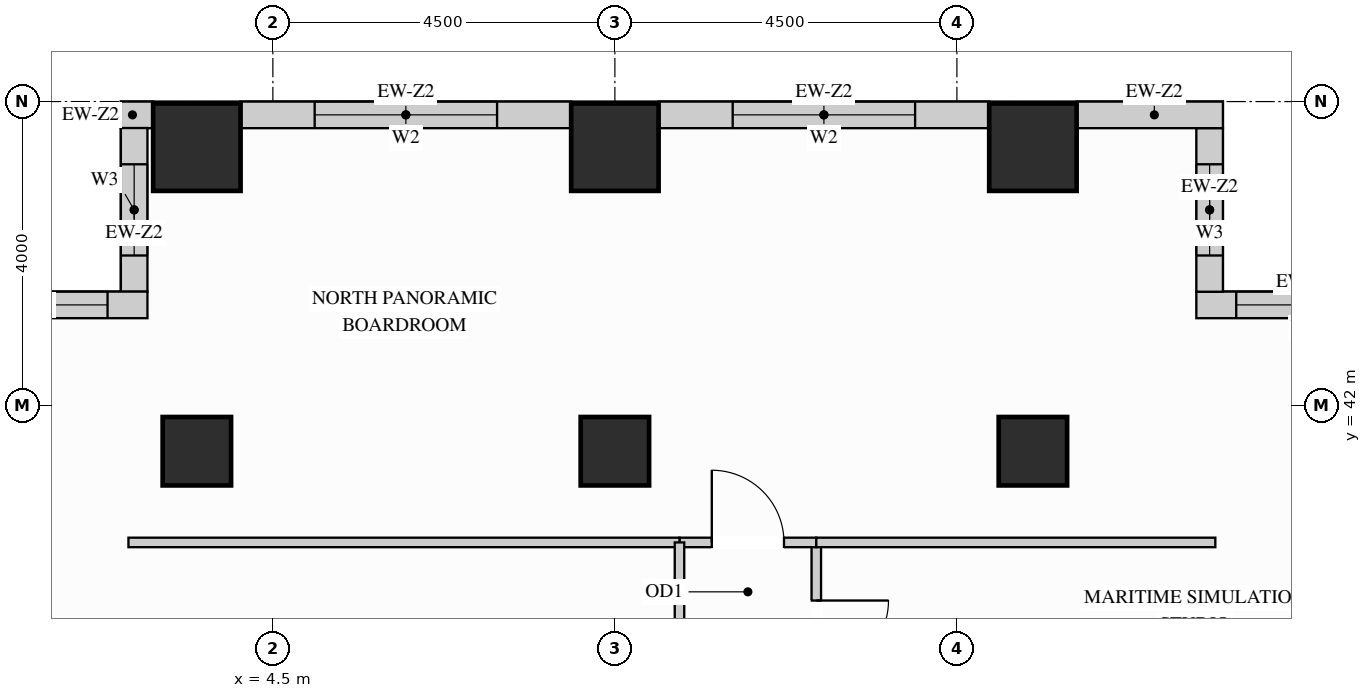
"""IFC4 building model, lengths in metres.
Left out: names, types, materials, properties, quantities, classifications, styles, units other than length and angle.
Written with IfcOpenShell. Run it as: python <this file> out.ifc"""

import sys

from ifc_helpers import new_model, si_unit, direction, frame, frame_2d, origin, origin_2d, place, context, subcontext, project, spatial, rectangle, extrude, source, transform, mapped, element, fill, save


model = new_model("IFC4")
c1 = context("Model", 3, precision=1e-05, world=origin(), true_north=direction((0.0, 1.0)))
c2 = subcontext(c1, "Body", "Model", "MODEL_VIEW")
j1 = project(units=[si_unit("LENGTHUNIT", "METRE"), si_unit("PLANEANGLEUNIT", "RADIAN")], contexts=[c1])
p1 = place(None, origin())
s1 = spatial("IfcSite", under=j1, at=p1, CompositionType="ELEMENT")
p2 = place(p1, origin())
s2 = spatial("IfcBuilding", under=s1, at=p2, CompositionType="ELEMENT")
p3 = place(p2, frame((0.0, 0.0, 127.8)))
s3 = spatial("IfcBuildingStorey", under=s2, at=p3, CompositionType="ELEMENT", Elevation=127.8)
m1 = source(origin(), c2, "Body", "SweptSolid", [
    extrude(rectangle(XDim=0.9, YDim=0.9, at=origin_2d()), origin(), (0.0, 0.0, 1.0), 3.38),
])
for number, where, z_axis, x_axis in (
    (1, (14.5, 41.4, 0.0), (0.0, 0.0, 1.0), (1.0, 0.0, 0.0)),
    (2, (3.5, 41.4, 0.0), (0.0, 0.0, 1.0), (1.0, 0.0, 0.0)),
    (3, (9.0, 41.4, 0.0), (0.0, 0.0, 1.0), (1.0, 0.0, 0.0)),
):
    element("IfcColumn", number, at=place(p3, frame(where, z_axis=z_axis, x_axis=x_axis)), inside=s3, PredefinedType="COLUMN", context=c2, shape_type="MappedRepresentation", body=[
        mapped(m1, transform((0.0, 0.0, 0.0), x_axis=(1.0, 0.0, 0.0), y_axis=(0.0, 1.0, 0.0), z_axis=(0.0, 0.0, 1.0))),
    ])
m2 = source(origin(), c2, "Body", "SweptSolid", [
    extrude(rectangle(XDim=1.15, YDim=1.15, at=origin_2d()), origin(), (0.0, 0.0, 1.0), 3.38),
])
for number, where, z_axis, x_axis in (
    (4, (14.5, 45.4, 0.0), (0.0, 0.0, 1.0), (1.0, 0.0, 0.0)),
    (5, (3.5, 45.4, 0.0), (0.0, 0.0, 1.0), (1.0, 0.0, 0.0)),
    (6, (9.0, 45.4, 0.0), (0.0, 0.0, 1.0), (1.0, 0.0, 0.0)),
):
    element("IfcColumn", number, at=place(p3, frame(where, z_axis=z_axis, x_axis=x_axis)), inside=s3, PredefinedType="COLUMN", context=c2, shape_type="MappedRepresentation", body=[
        mapped(m2, transform((0.0, 0.0, 0.0), x_axis=(1.0, 0.0, 0.0), y_axis=(0.0, 1.0, 0.0), z_axis=(0.0, 0.0, 1.0))),
    ])
p4 = place(p3, frame((19.5, 43.325, 0.0), z_axis=(0.0, 0.0, 1.0), x_axis=(-1.0, 0.0, 0.0)))
e7 = element("IfcWall", 7, at=p4, inside=s3, PredefinedType="SOLIDWALL", context=c2, shape_type="SweptSolid", body=[
    extrude(rectangle(XDim=2.85, YDim=0.35, at=frame_2d((1.425, 0.0))), origin(), (0.0, 0.0, 1.0), 3.365),
])
p5 = place(p4, frame((0.525, 0.0, 0.78)))
e8 = element("IfcOpeningElement", 8, at=p5, cuts=e7, PredefinedType="OPENING", context=c2, shape_type="SweptSolid", body=[
    extrude(rectangle(XDim=1.8, YDim=2.1, at=frame_2d((0.9, 1.05))), frame((0.0, 0.185, 0.0), z_axis=(0.0, -1.0, 0.0), x_axis=(1.0, 0.0, 0.0)), (0.0, 0.0, 1.0), 0.37),
])
p6 = place(p3, frame((16.825, 43.498, 0.0), z_axis=(0.0, 0.0, 1.0), x_axis=(0.0, 1.0, 0.0)))
e9 = element("IfcWall", 9, at=p6, inside=s3, PredefinedType="SOLIDWALL", context=c2, shape_type="SweptSolid", body=[
    extrude(rectangle(XDim=2.154, YDim=0.35, at=frame_2d((1.077, 0.0))), origin(), (0.0, 0.0, 1.0), 3.365),
])
p7 = place(p6, frame((0.477, 0.0, 0.78)))
e10 = element("IfcOpeningElement", 10, at=p7, cuts=e9, PredefinedType="OPENING", context=c2, shape_type="SweptSolid", body=[
    extrude(rectangle(XDim=1.2, YDim=2.1, at=frame_2d((0.6, 1.05))), frame((0.0, 0.185, 0.0), z_axis=(0.0, -1.0, 0.0), x_axis=(1.0, 0.0, 0.0)), (0.0, 0.0, 1.0), 0.37),
])
m3 = source(origin(), c2, "Body", "SweptSolid", [
    extrude(rectangle(XDim=1.927, YDim=0.35, at=frame_2d((0.963, 0.0))), origin(), (0.0, 0.0, 1.0), 3.365),
])
p8 = place(p3, frame((17.0, 45.825, 0.0), z_axis=(0.0, 0.0, 1.0), x_axis=(-1.0, 0.0, 0.0)))
e11 = element("IfcWall", 11, at=p8, inside=s3, PredefinedType="SOLIDWALL", context=c2, shape_type="MappedRepresentation", body=[
    mapped(m3, transform((0.0, 0.0, 0.0), x_axis=(1.0, 0.0, 0.0), y_axis=(0.0, 1.0, 0.0), z_axis=(0.0, 0.0, 1.0))),
])
p9 = place(p3, frame((13.927, 45.825, 0.0), z_axis=(0.0, 0.0, 1.0), x_axis=(-1.0, 0.0, 0.0)))
e12 = element("IfcWall", 12, at=p9, inside=s3, PredefinedType="SOLIDWALL", context=c2, shape_type="SweptSolid", body=[
    extrude(rectangle(XDim=4.354, YDim=0.35, at=frame_2d((2.177, 0.0))), origin(), (0.0, 0.0, 1.0), 3.365),
])
p10 = place(p9, frame((0.977, 0.0, 0.78)))
e13 = element("IfcOpeningElement", 13, at=p10, cuts=e12, PredefinedType="OPENING", context=c2, shape_type="SweptSolid", body=[
    extrude(rectangle(XDim=2.4, YDim=2.1, at=frame_2d((1.2, 1.05))), frame((0.0, 0.185, 0.0), z_axis=(0.0, -1.0, 0.0), x_axis=(1.0, 0.0, 0.0)), (0.0, 0.0, 1.0), 0.37),
])
p11 = place(p3, frame((8.427, 45.825, 0.0), z_axis=(0.0, 0.0, 1.0), x_axis=(-1.0, 0.0, 0.0)))
e14 = element("IfcWall", 14, at=p11, inside=s3, PredefinedType="SOLIDWALL", context=c2, shape_type="SweptSolid", body=[
    extrude(rectangle(XDim=4.354, YDim=0.35, at=frame_2d((2.177, 0.0))), origin(), (0.0, 0.0, 1.0), 3.365),
])
p12 = place(p11, frame((0.977, 0.0, 0.78)))
e15 = element("IfcOpeningElement", 15, at=p12, cuts=e14, PredefinedType="OPENING", context=c2, shape_type="SweptSolid", body=[
    extrude(rectangle(XDim=2.4, YDim=2.1, at=frame_2d((1.2, 1.05))), frame((0.0, 0.185, 0.0), z_axis=(0.0, -1.0, 0.0), x_axis=(1.0, 0.0, 0.0)), (0.0, 0.0, 1.0), 0.37),
])
m4 = source(origin(), c2, "Body", "SweptSolid", [
    extrude(rectangle(XDim=0.427, YDim=0.35, at=frame_2d((0.213, 0.0))), origin(), (0.0, 0.0, 1.0), 3.365),
])
p13 = place(p3, frame((2.927, 45.825, 0.0), z_axis=(0.0, 0.0, 1.0), x_axis=(-1.0, 0.0, 0.0)))
e16 = element("IfcWall", 16, at=p13, inside=s3, PredefinedType="SOLIDWALL", context=c2, shape_type="MappedRepresentation", body=[
    mapped(m4, transform((0.0, 0.0, 0.0), x_axis=(1.0, 0.0, 0.0), y_axis=(0.0, 1.0, 0.0), z_axis=(0.0, 0.0, 1.0))),
])
p14 = place(p3, frame((2.675, 45.652, 0.0), z_axis=(0.0, 0.0, 1.0), x_axis=(0.0, -1.0, 0.0)))
e17 = element("IfcWall", 17, at=p14, inside=s3, PredefinedType="SOLIDWALL", context=c2, shape_type="SweptSolid", body=[
    extrude(rectangle(XDim=2.154, YDim=0.35, at=frame_2d((1.077, 0.0))), origin(), (0.0, 0.0, 1.0), 3.365),
])
p15 = place(p14, frame((0.477, 0.0, 0.78)))
e18 = element("IfcOpeningElement", 18, at=p15, cuts=e17, PredefinedType="OPENING", context=c2, shape_type="SweptSolid", body=[
    extrude(rectangle(XDim=1.2, YDim=2.1, at=frame_2d((0.6, 1.05))), frame((0.0, 0.185, 0.0), z_axis=(0.0, -1.0, 0.0), x_axis=(1.0, 0.0, 0.0)), (0.0, 0.0, 1.0), 0.37),
])
p16 = place(p3, frame((2.85, 43.325, 0.0), z_axis=(0.0, 0.0, 1.0), x_axis=(-1.0, 0.0, 0.0)))
e19 = element("IfcWall", 19, at=p16, inside=s3, PredefinedType="SOLIDWALL", context=c2, shape_type="SweptSolid", body=[
    extrude(rectangle(XDim=2.85, YDim=0.35, at=frame_2d((1.425, 0.0))), origin(), (0.0, 0.0, 1.0), 3.365),
])
p17 = place(p16, frame((0.525, 0.0, 0.78)))
e20 = element("IfcOpeningElement", 20, at=p17, cuts=e19, PredefinedType="OPENING", context=c2, shape_type="SweptSolid", body=[
    extrude(rectangle(XDim=1.8, YDim=2.1, at=frame_2d((0.9, 1.05))), frame((0.0, 0.185, 0.0), z_axis=(0.0, -1.0, 0.0), x_axis=(1.0, 0.0, 0.0)), (0.0, 0.0, 1.0), 0.37),
])
p18 = place(p3, frame((11.65, 37.721, 0.0), z_axis=(0.0, 0.0, 1.0), x_axis=(0.0, 1.0, 0.0)))
e21 = element("IfcWall", 21, at=p18, inside=s3, PredefinedType="PARTITIONING", context=c2, shape_type="SweptSolid", body=[
    extrude(rectangle(XDim=2.479, YDim=0.125, at=frame_2d((1.24, 0.0))), origin(), (0.0, 0.0, 1.0), 3.365),
])
p19 = place(p18, frame((0.764, 0.0, 0.0)))
e22 = element("IfcOpeningElement", 22, at=p19, cuts=e21, PredefinedType="OPENING", context=c2, shape_type="SweptSolid", body=[
    extrude(rectangle(XDim=0.95, YDim=2.15, at=frame_2d((0.475, 1.075))), frame((0.0, 0.073, 0.0), z_axis=(0.0, -1.0, 0.0), x_axis=(1.0, 0.0, 0.0)), (0.0, 0.0, 1.0), 0.145),
])
p20 = place(p3, frame((9.85, 40.2, 0.0), z_axis=(0.0, 0.0, 1.0), x_axis=(1.0, 0.0, 0.0)))
e23 = element("IfcWall", 23, at=p20, inside=s3, PredefinedType="PARTITIONING", context=c2, shape_type="SweptSolid", body=[
    extrude(rectangle(XDim=1.8, YDim=0.125, at=frame_2d((0.9, 0.0))), origin(), (0.0, 0.0, 1.0), 3.365),
])
p21 = place(p20, frame((0.425, 0.0, 0.0)))
e24 = element("IfcOpeningElement", 24, at=p21, cuts=e23, PredefinedType="OPENING", context=c2, shape_type="SweptSolid", body=[
    extrude(rectangle(XDim=0.95, YDim=2.15, at=frame_2d((0.475, 1.075))), frame((0.0, 0.073, 0.0), z_axis=(0.0, -1.0, 0.0), x_axis=(1.0, 0.0, 0.0)), (0.0, 0.0, 1.0), 0.145),
])
m5 = source(origin(), c2, "Body", "SweptSolid", [
    extrude(rectangle(XDim=5.25, YDim=0.125, at=frame_2d((2.625, 0.0))), origin(), (0.0, 0.0, 1.0), 3.365),
])
p22 = place(p3, frame((11.65, 40.2, 0.0), z_axis=(0.0, 0.0, 1.0), x_axis=(1.0, 0.0, 0.0)))
e25 = element("IfcWall", 25, at=p22, inside=s3, PredefinedType="PARTITIONING", context=c2, shape_type="MappedRepresentation", body=[
    mapped(m5, transform((0.0, 0.0, 0.0), x_axis=(1.0, 0.0, 0.0), y_axis=(0.0, 1.0, 0.0), z_axis=(0.0, 0.0, 1.0))),
])
m6 = source(origin(), c2, "Body", "SweptSolid", [
    extrude(rectangle(XDim=7.25, YDim=0.125, at=frame_2d((3.625, 0.0))), origin(), (0.0, 0.0, 1.0), 3.365),
])
p23 = place(p3, frame((2.6, 40.2, 0.0), z_axis=(0.0, 0.0, 1.0), x_axis=(1.0, 0.0, 0.0)))
e26 = element("IfcWall", 26, at=p23, inside=s3, PredefinedType="PARTITIONING", context=c2, shape_type="MappedRepresentation", body=[
    mapped(m6, transform((0.0, 0.0, 0.0), x_axis=(1.0, 0.0, 0.0), y_axis=(0.0, 1.0, 0.0), z_axis=(0.0, 0.0, 1.0))),
])
p24 = place(p3, frame((9.85, 35.498, 0.0), z_axis=(0.0, 0.0, 1.0), x_axis=(0.0, 1.0, 0.0)))
e27 = element("IfcWall", 27, at=p24, inside=s3, PredefinedType="PARTITIONING", context=c2, shape_type="SweptSolid", body=[
    extrude(rectangle(XDim=4.702, YDim=0.125, at=frame_2d((2.351, 0.0))), origin(), (0.0, 0.0, 1.0), 3.365),
])
p25 = place(p24, frame((0.392, 0.0, 0.0)))
e28 = element("IfcOpeningElement", 28, at=p25, cuts=e27, PredefinedType="OPENING", context=c2, shape_type="SweptSolid", body=[
    extrude(rectangle(XDim=0.95, YDim=2.15, at=frame_2d((0.475, 1.075))), frame((0.0, 0.073, 0.0), z_axis=(0.0, -1.0, 0.0), x_axis=(1.0, 0.0, 0.0)), (0.0, 0.0, 1.0), 0.145),
])
m7 = source(origin(), c2, "Body", "SweptSolid", [
    extrude(rectangle(XDim=0.95, YDim=2.15, at=frame_2d((0.475, 1.075))), frame((0.0, 0.025, 0.0), z_axis=(0.0, -1.0, 0.0), x_axis=(1.0, 0.0, 0.0)), (0.0, 0.0, 1.0), 0.05),
])
p26 = place(p19, origin())
e29 = element("IfcDoor", 29, at=p26, inside=s3, OperationType="SINGLE_SWING_RIGHT", PredefinedType="DOOR", context=c2, shape_type="MappedRepresentation", body=[
    mapped(m7, transform((0.0, 0.0, 0.0), x_axis=(1.0, 0.0, 0.0), y_axis=(0.0, 1.0, 0.0), z_axis=(0.0, 0.0, 1.0))),
])
fill(e22, e29)
p27 = place(p21, origin())
e30 = element("IfcDoor", 30, at=p27, inside=s3, OperationType="SINGLE_SWING_LEFT", PredefinedType="DOOR", context=c2, shape_type="MappedRepresentation", body=[
    mapped(m7, transform((0.0, 0.0, 0.0), x_axis=(1.0, 0.0, 0.0), y_axis=(0.0, 1.0, 0.0), z_axis=(0.0, 0.0, 1.0))),
])
fill(e24, e30)
m8 = source(origin(), c2, "Body", "SweptSolid", [
    extrude(rectangle(XDim=1.8, YDim=2.1, at=frame_2d((0.9, 1.05))), frame((0.0, 0.03, 0.0), z_axis=(0.0, -1.0, 0.0), x_axis=(1.0, 0.0, 0.0)), (0.0, 0.0, 1.0), 0.06),
])
p28 = place(p5, origin())
e31 = element("IfcWindow", 31, at=p28, inside=s3, PartitioningType="SINGLE_PANEL", PredefinedType="WINDOW", context=c2, shape_type="MappedRepresentation", body=[
    mapped(m8, transform((0.0, 0.0, 0.0), x_axis=(1.0, 0.0, 0.0), y_axis=(0.0, 1.0, 0.0), z_axis=(0.0, 0.0, 1.0))),
])
fill(e8, e31)
p29 = place(p17, origin())
e32 = element("IfcWindow", 32, at=p29, inside=s3, PartitioningType="SINGLE_PANEL", PredefinedType="WINDOW", context=c2, shape_type="MappedRepresentation", body=[
    mapped(m8, transform((0.0, 0.0, 0.0), x_axis=(1.0, 0.0, 0.0), y_axis=(0.0, 1.0, 0.0), z_axis=(0.0, 0.0, 1.0))),
])
fill(e20, e32)
m9 = source(origin(), c2, "Body", "SweptSolid", [
    extrude(rectangle(XDim=2.4, YDim=2.1, at=frame_2d((1.2, 1.05))), frame((0.0, 0.03, 0.0), z_axis=(0.0, -1.0, 0.0), x_axis=(1.0, 0.0, 0.0)), (0.0, 0.0, 1.0), 0.06),
])
p30 = place(p10, origin())
e33 = element("IfcWindow", 33, at=p30, inside=s3, PartitioningType="SINGLE_PANEL", PredefinedType="WINDOW", context=c2, shape_type="MappedRepresentation", body=[
    mapped(m9, transform((0.0, 0.0, 0.0), x_axis=(1.0, 0.0, 0.0), y_axis=(0.0, 1.0, 0.0), z_axis=(0.0, 0.0, 1.0))),
])
fill(e13, e33)
p31 = place(p12, origin())
e34 = element("IfcWindow", 34, at=p31, inside=s3, PartitioningType="SINGLE_PANEL", PredefinedType="WINDOW", context=c2, shape_type="MappedRepresentation", body=[
    mapped(m9, transform((0.0, 0.0, 0.0), x_axis=(1.0, 0.0, 0.0), y_axis=(0.0, 1.0, 0.0), z_axis=(0.0, 0.0, 1.0))),
])
fill(e15, e34)
m10 = source(origin(), c2, "Body", "SweptSolid", [
    extrude(rectangle(XDim=1.2, YDim=2.1, at=frame_2d((0.6, 1.05))), frame((0.0, 0.03, 0.0), z_axis=(0.0, -1.0, 0.0), x_axis=(1.0, 0.0, 0.0)), (0.0, 0.0, 1.0), 0.06),
])
p32 = place(p7, origin())
e35 = element("IfcWindow", 35, at=p32, inside=s3, PartitioningType="SINGLE_PANEL", PredefinedType="WINDOW", context=c2, shape_type="MappedRepresentation", body=[
    mapped(m10, transform((0.0, 0.0, 0.0), x_axis=(1.0, 0.0, 0.0), y_axis=(0.0, 1.0, 0.0), z_axis=(0.0, 0.0, 1.0))),
])
fill(e10, e35)
p33 = place(p15, origin())
e36 = element("IfcWindow", 36, at=p33, inside=s3, PartitioningType="SINGLE_PANEL", PredefinedType="WINDOW", context=c2, shape_type="MappedRepresentation", body=[
    mapped(m10, transform((0.0, 0.0, 0.0), x_axis=(1.0, 0.0, 0.0), y_axis=(0.0, 1.0, 0.0), z_axis=(0.0, 0.0, 1.0))),
])
fill(e18, e36)
save(model, sys.argv[1])
